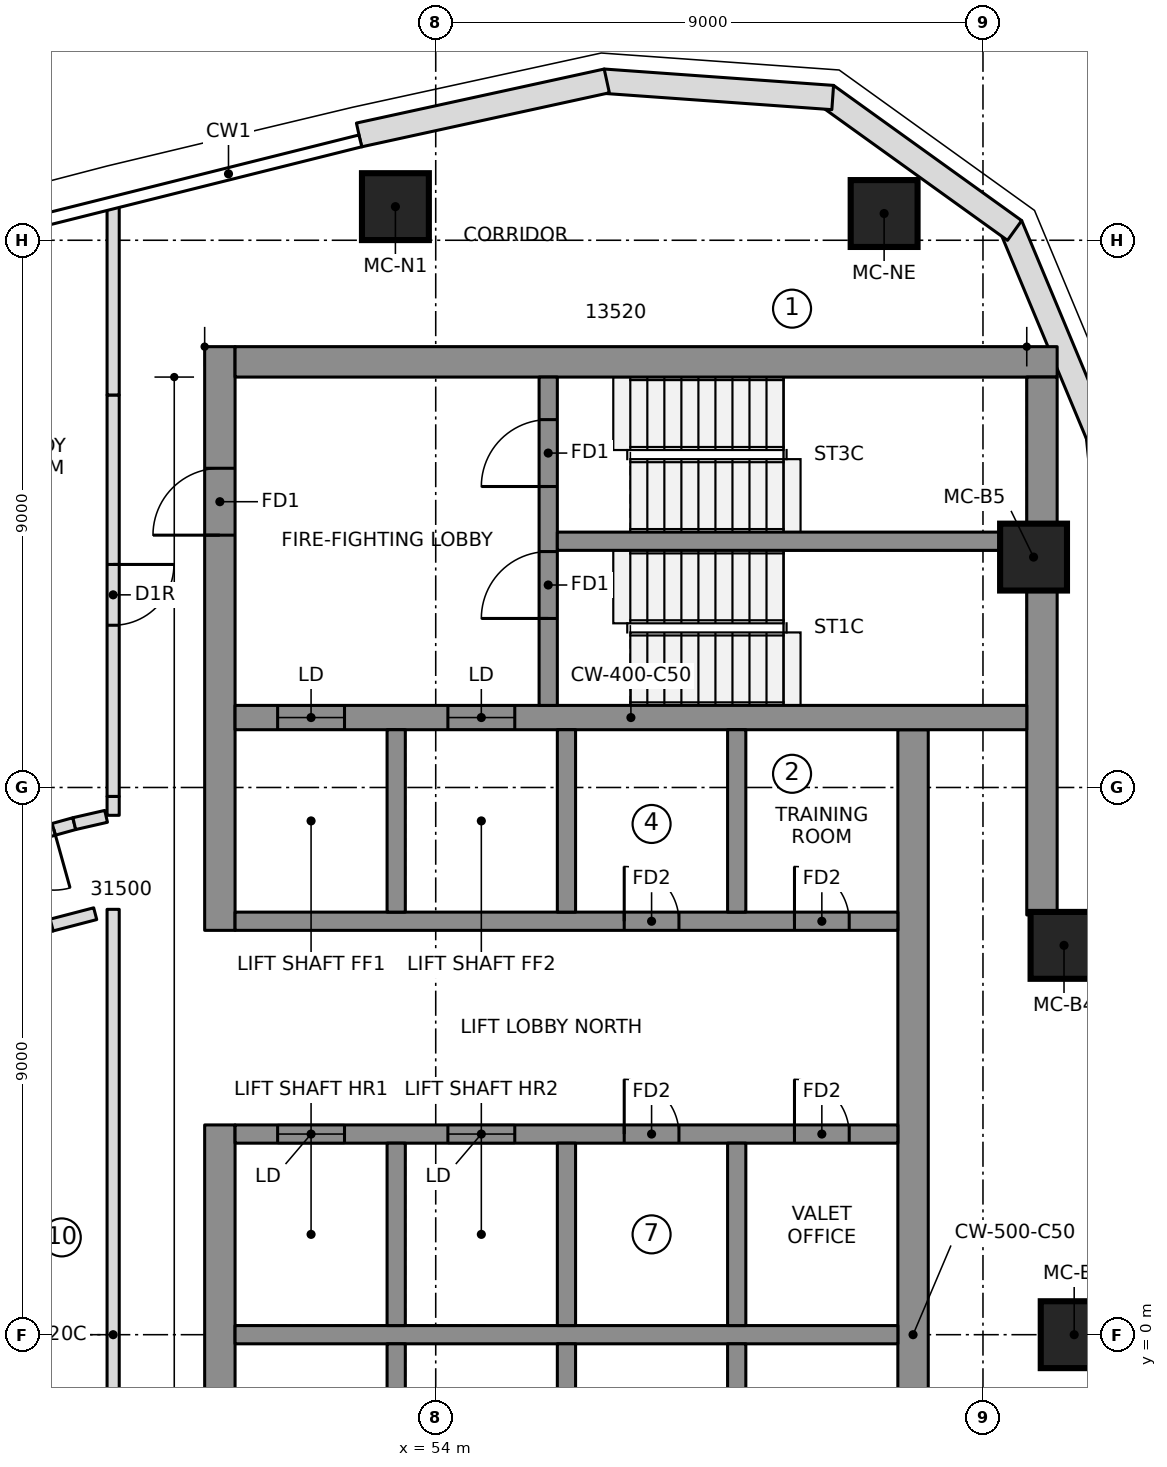
"""IFC4 building model, lengths in metres.
Left out: names, types, materials, properties, quantities, classifications, styles, units other than length and angle.
Written with IfcOpenShell. Run it as: python <this file> out.ifc"""

import sys

from ifc_helpers import new_model, si_unit, direction, frame, frame_2d, origin, origin_2d, place, context, subcontext, project, spatial, polyline, rectangle, outline, extrude, element, fill, save


model = new_model("IFC4")
c1 = context("Model", 3, precision=1e-05, world=origin(), true_north=direction((0.0, 1.0)))
c2 = subcontext(c1, "Body", "Model", "MODEL_VIEW")
j1 = project(units=[si_unit("LENGTHUNIT", "METRE"), si_unit("PLANEANGLEUNIT", "RADIAN")], contexts=[c1])
p1 = place(None, origin())
s1 = spatial("IfcSite", under=j1, at=p1, CompositionType="ELEMENT")
p2 = place(p1, origin())
s2 = spatial("IfcBuilding", under=s1, at=p2, CompositionType="ELEMENT")
p3 = place(p2, frame((0.0, 0.0, 267.9)))
s3 = spatial("IfcBuildingStorey", under=s2, at=p3, CompositionType="ELEMENT", Elevation=267.9)
p4 = place(p3, frame((50.45, 6.65, 0.0), z_axis=(0.0, 0.0, 1.0), x_axis=(0.0, 1.0, 0.0)))
e1 = element("IfcWall", 1, at=p4, inside=s3, PredefinedType="SHEAR", context=c2, shape_type="SweptSolid", body=[
    extrude(rectangle(XDim=9.6, YDim=0.5, at=frame_2d((4.8, 0.0))), origin(), (0.0, 0.0, 1.0), 3.55),
])
p5 = place(p4, frame((6.5, 0.0, 0.0)))
e2 = element("IfcOpeningElement", 2, at=p5, cuts=e1, PredefinedType="OPENING", context=c2, shape_type="SweptSolid", body=[
    extrude(rectangle(XDim=1.1, YDim=2.1, at=frame_2d((0.55, 1.05))), frame((0.0, 0.26, 0.0), z_axis=(0.0, -1.0, 0.0), x_axis=(1.0, 0.0, 0.0)), (0.0, 0.0, 1.0), 0.52),
])
p6 = place(p3, frame((50.45, -3.45, 0.0), z_axis=(0.0, 0.0, 1.0), x_axis=(0.0, 1.0, 0.0)))
e3 = element("IfcWall", 3, at=p6, inside=s3, PredefinedType="SHEAR", context=c2, shape_type="SweptSolid", body=[
    extrude(rectangle(XDim=6.9, YDim=0.5, at=frame_2d((3.45, 0.0))), origin(), (0.0, 0.0, 1.0), 3.55),
])
p7 = place(p3, frame((50.7, 16.0, 0.0), z_axis=(0.0, 0.0, 1.0), x_axis=(1.0, 0.0, 0.0)))
e4 = element("IfcWall", 4, at=p7, inside=s3, PredefinedType="SHEAR", context=c2, shape_type="SweptSolid", body=[
    extrude(rectangle(XDim=13.52, YDim=0.5, at=frame_2d((6.76, 0.0))), origin(), (0.0, 0.0, 1.0), 3.55),
])
p8 = place(p3, frame((63.97, 6.903, 0.0), z_axis=(0.0, 0.0, 1.0), x_axis=(0.0, 1.0, 0.0)))
e5 = element("IfcWall", 5, at=p8, inside=s3, PredefinedType="SHEAR", context=c2, shape_type="SweptSolid", body=[
    extrude(rectangle(XDim=8.847, YDim=0.5, at=frame_2d((4.423, 0.0))), origin(), (0.0, 0.0, 1.0), 3.55),
])
p9 = place(p3, frame((61.85, -9.95, 0.0), z_axis=(0.0, 0.0, 1.0), x_axis=(0.0, 1.0, 0.0)))
e6 = element("IfcWall", 6, at=p9, inside=s3, PredefinedType="SHEAR", context=c2, shape_type="SweptSolid", body=[
    extrude(rectangle(XDim=19.9, YDim=0.5, at=frame_2d((9.95, 0.0))), origin(), (0.0, 0.0, 1.0), 3.55),
])
p10 = place(p3, frame((50.7, 10.15, 0.0), z_axis=(0.0, 0.0, 1.0), x_axis=(1.0, 0.0, 0.0)))
e7 = element("IfcWall", 7, at=p10, inside=s3, PredefinedType="SHEAR", context=c2, shape_type="SweptSolid", body=[
    extrude(rectangle(XDim=13.02, YDim=0.4, at=frame_2d((6.51, 0.0))), origin(), (0.0, 0.0, 1.0), 3.55),
])
p11 = place(p10, frame((0.7, 0.0, 0.0)))
e8 = element("IfcOpeningElement", 8, at=p11, cuts=e7, PredefinedType="OPENING", context=c2, shape_type="SweptSolid", body=[
    extrude(rectangle(XDim=1.1, YDim=2.1, at=frame_2d((0.55, 1.05))), frame((0.0, 0.21, 0.0), z_axis=(0.0, -1.0, 0.0), x_axis=(1.0, 0.0, 0.0)), (0.0, 0.0, 1.0), 0.42),
])
p12 = place(p10, frame((3.5, 0.0, 0.0)))
e9 = element("IfcOpeningElement", 9, at=p12, cuts=e7, PredefinedType="OPENING", context=c2, shape_type="SweptSolid", body=[
    extrude(rectangle(XDim=1.1, YDim=2.1, at=frame_2d((0.55, 1.05))), frame((0.0, 0.21, 0.0), z_axis=(0.0, -1.0, 0.0), x_axis=(1.0, 0.0, 0.0)), (0.0, 0.0, 1.0), 0.42),
])
p13 = place(p3, frame((50.7, 0.0, 0.0), z_axis=(0.0, 0.0, 1.0), x_axis=(1.0, 0.0, 0.0)))
e10 = element("IfcWall", 10, at=p13, inside=s3, PredefinedType="SHEAR", context=c2, shape_type="SweptSolid", body=[
    extrude(rectangle(XDim=10.9, YDim=0.3, at=frame_2d((5.45, 0.0))), origin(), (0.0, 0.0, 1.0), 3.55),
])
p14 = place(p3, frame((50.7, 3.3, 0.0), z_axis=(0.0, 0.0, 1.0), x_axis=(1.0, 0.0, 0.0)))
e11 = element("IfcWall", 11, at=p14, inside=s3, PredefinedType="SHEAR", context=c2, shape_type="SweptSolid", body=[
    extrude(rectangle(XDim=10.9, YDim=0.3, at=frame_2d((5.45, 0.0))), origin(), (0.0, 0.0, 1.0), 3.55),
])
p15 = place(p14, frame((0.7, 0.0, 0.0)))
e12 = element("IfcOpeningElement", 12, at=p15, cuts=e11, PredefinedType="OPENING", context=c2, shape_type="SweptSolid", body=[
    extrude(rectangle(XDim=1.1, YDim=2.1, at=frame_2d((0.55, 1.05))), frame((0.0, 0.16, 0.0), z_axis=(0.0, -1.0, 0.0), x_axis=(1.0, 0.0, 0.0)), (0.0, 0.0, 1.0), 0.32),
])
p16 = place(p14, frame((3.5, 0.0, 0.0)))
e13 = element("IfcOpeningElement", 13, at=p16, cuts=e11, PredefinedType="OPENING", context=c2, shape_type="SweptSolid", body=[
    extrude(rectangle(XDim=1.1, YDim=2.1, at=frame_2d((0.55, 1.05))), frame((0.0, 0.16, 0.0), z_axis=(0.0, -1.0, 0.0), x_axis=(1.0, 0.0, 0.0)), (0.0, 0.0, 1.0), 0.32),
])
p17 = place(p14, frame((6.4, 0.0, 0.0)))
e14 = element("IfcOpeningElement", 14, at=p17, cuts=e11, PredefinedType="OPENING", context=c2, shape_type="SweptSolid", body=[
    extrude(rectangle(XDim=0.9, YDim=2.1, at=frame_2d((0.45, 1.05))), frame((0.0, 0.16, 0.0), z_axis=(0.0, -1.0, 0.0), x_axis=(1.0, 0.0, 0.0)), (0.0, 0.0, 1.0), 0.32),
])
p18 = place(p14, frame((9.2, 0.0, 0.0)))
e15 = element("IfcOpeningElement", 15, at=p18, cuts=e11, PredefinedType="OPENING", context=c2, shape_type="SweptSolid", body=[
    extrude(rectangle(XDim=0.9, YDim=2.1, at=frame_2d((0.45, 1.05))), frame((0.0, 0.16, 0.0), z_axis=(0.0, -1.0, 0.0), x_axis=(1.0, 0.0, 0.0)), (0.0, 0.0, 1.0), 0.32),
])
p19 = place(p3, frame((50.7, 6.8, 0.0), z_axis=(0.0, 0.0, 1.0), x_axis=(1.0, 0.0, 0.0)))
e16 = element("IfcWall", 16, at=p19, inside=s3, PredefinedType="SHEAR", context=c2, shape_type="SweptSolid", body=[
    extrude(rectangle(XDim=10.9, YDim=0.3, at=frame_2d((5.45, 0.0))), origin(), (0.0, 0.0, 1.0), 3.55),
])
p20 = place(p19, frame((6.4, 0.0, 0.0)))
e17 = element("IfcOpeningElement", 17, at=p20, cuts=e16, PredefinedType="OPENING", context=c2, shape_type="SweptSolid", body=[
    extrude(rectangle(XDim=0.9, YDim=2.1, at=frame_2d((0.45, 1.05))), frame((0.0, 0.16, 0.0), z_axis=(0.0, -1.0, 0.0), x_axis=(1.0, 0.0, 0.0)), (0.0, 0.0, 1.0), 0.32),
])
p21 = place(p19, frame((9.2, 0.0, 0.0)))
e18 = element("IfcOpeningElement", 18, at=p21, cuts=e16, PredefinedType="OPENING", context=c2, shape_type="SweptSolid", body=[
    extrude(rectangle(XDim=0.9, YDim=2.1, at=frame_2d((0.45, 1.05))), frame((0.0, 0.16, 0.0), z_axis=(0.0, -1.0, 0.0), x_axis=(1.0, 0.0, 0.0)), (0.0, 0.0, 1.0), 0.32),
])
for number, where, z_axis, x_axis in (
    (19, (53.35, 0.15, 0.0), (0.0, 0.0, 1.0), (0.0, 1.0, 0.0)),
    (20, (53.35, 6.95, 0.0), (0.0, 0.0, 1.0), (0.0, 1.0, 0.0)),
    (21, (56.15, 0.15, 0.0), (0.0, 0.0, 1.0), (0.0, 1.0, 0.0)),
    (22, (56.15, 6.95, 0.0), (0.0, 0.0, 1.0), (0.0, 1.0, 0.0)),
    (23, (58.95, 0.15, 0.0), (0.0, 0.0, 1.0), (0.0, 1.0, 0.0)),
    (24, (58.95, 6.95, 0.0), (0.0, 0.0, 1.0), (0.0, 1.0, 0.0)),
    (25, (53.35, -3.15, 0.0), (0.0, 0.0, 1.0), (0.0, 1.0, 0.0)),
    (26, (56.15, -3.15, 0.0), (0.0, 0.0, 1.0), (0.0, 1.0, 0.0)),
    (27, (58.95, -3.15, 0.0), (0.0, 0.0, 1.0), (0.0, 1.0, 0.0)),
):
    element("IfcWall", number, at=place(p3, frame(where, z_axis=z_axis, x_axis=x_axis)), inside=s3, PredefinedType="SHEAR", context=c2, shape_type="SweptSolid", body=[
        extrude(rectangle(XDim=3.0, YDim=0.3, at=frame_2d((1.5, 0.0))), origin(), (0.0, 0.0, 1.0), 3.55),
    ])
p22 = place(p3, frame((55.85, 10.35, 0.0), z_axis=(0.0, 0.0, 1.0), x_axis=(0.0, 1.0, 0.0)))
e28 = element("IfcWall", 28, at=p22, inside=s3, PredefinedType="SHEAR", context=c2, shape_type="SweptSolid", body=[
    extrude(rectangle(XDim=5.4, YDim=0.3, at=frame_2d((2.7, 0.0))), origin(), (0.0, 0.0, 1.0), 3.55),
])
p23 = place(p22, frame((1.43, 0.0, 0.0)))
e29 = element("IfcOpeningElement", 29, at=p23, cuts=e28, PredefinedType="OPENING", context=c2, shape_type="SweptSolid", body=[
    extrude(rectangle(XDim=1.1, YDim=2.1, at=frame_2d((0.55, 1.05))), frame((0.0, 0.16, 0.0), z_axis=(0.0, -1.0, 0.0), x_axis=(1.0, 0.0, 0.0)), (0.0, 0.0, 1.0), 0.32),
])
p24 = place(p22, frame((3.6, 0.0, 0.0)))
e30 = element("IfcOpeningElement", 30, at=p24, cuts=e28, PredefinedType="OPENING", context=c2, shape_type="SweptSolid", body=[
    extrude(rectangle(XDim=1.1, YDim=2.1, at=frame_2d((0.55, 1.05))), frame((0.0, 0.16, 0.0), z_axis=(0.0, -1.0, 0.0), x_axis=(1.0, 0.0, 0.0)), (0.0, 0.0, 1.0), 0.32),
])
p25 = place(p3, frame((56.0, 13.05, 0.0), z_axis=(0.0, 0.0, 1.0), x_axis=(1.0, 0.0, 0.0)))
e31 = element("IfcWall", 31, at=p25, inside=s3, PredefinedType="SHEAR", context=c2, shape_type="SweptSolid", body=[
    extrude(rectangle(XDim=7.72, YDim=0.3, at=frame_2d((3.86, 0.0))), origin(), (0.0, 0.0, 1.0), 3.55),
])
for number, where, z_axis, x_axis in (
    (32, (64.5, 0.0, 0.0), (0.0, 0.0, 1.0), (1.0, 0.0, 0.0)),
    (33, (64.333, 6.403, 0.0), (0.0, 0.0, 1.0), (1.0, 0.0, 0.0)),
    (34, (63.832, 12.789, 0.0), (0.0, 0.0, 1.0), (1.0, 0.0, 0.0)),
    (35, (61.374, 18.44, 0.0), (0.0, 0.0, 1.0), (1.0, 0.0, 0.0)),
    (36, (53.337, 18.553, 0.0), (0.0, 0.0, 1.0), (1.0, 0.0, 0.0)),
):
    element("IfcColumn", number, at=place(p3, frame(where, z_axis=z_axis, x_axis=x_axis)), inside=s3, PredefinedType="COLUMN", context=c2, shape_type="SweptSolid", body=[
        extrude(rectangle(XDim=1.1, YDim=1.1, at=origin_2d()), origin(), (0.0, 0.0, 1.0), 3.55),
    ])
p26 = place(p3, frame((65.331, 10.571, 0.0), z_axis=(0.0, 0.0, 1.0), x_axis=(-0.102249826987, 0.994758751096, 0.0)))
e37 = element("IfcWall", 37, at=p26, inside=s3, PredefinedType="NOTDEFINED", context=c2, shape_type="SweptSolid", body=[
    extrude(outline(polyline([(-0.003, -0.2), (4.263, -0.2), (4.204, 0.2), (0.003, 0.2), (-0.003, -0.2)])), origin(), (0.0, 0.0, 1.0), 3.25),
])
p27 = place(p3, frame((64.898, 14.782, 0.0), z_axis=(0.0, 0.0, 1.0), x_axis=(-0.385285857918, 0.922797273343, 0.0)))
e38 = element("IfcWall", 38, at=p27, inside=s3, PredefinedType="NOTDEFINED", context=c2, shape_type="SweptSolid", body=[
    extrude(outline(polyline([(-0.03, -0.2), (3.753, -0.2), (3.64, 0.2), (0.03, 0.2), (-0.03, -0.2)])), origin(), (0.0, 0.0, 1.0), 3.25),
])
p28 = place(p3, frame((63.474, 18.194, 0.0), z_axis=(0.0, 0.0, 1.0), x_axis=(-0.811962548682, 0.583709533533, 0.0)))
e39 = element("IfcWall", 39, at=p28, inside=s3, PredefinedType="NOTDEFINED", context=c2, shape_type="SweptSolid", body=[
    extrude(outline(polyline([(-0.057, -0.2), (3.753, -0.2), (3.64, 0.2), (0.057, 0.2), (-0.057, -0.2)])), origin(), (0.0, 0.0, 1.0), 3.25),
])
p29 = place(p3, frame((60.472, 20.352, 0.0), z_axis=(0.0, 0.0, 1.0), x_axis=(-0.99746272096, 0.071190731806, 0.0)))
e40 = element("IfcWall", 40, at=p29, inside=s3, PredefinedType="NOTDEFINED", context=c2, shape_type="SweptSolid", body=[
    extrude(outline(polyline([(-0.057, -0.2), (3.726, -0.2), (3.668, 0.2), (0.057, 0.2), (-0.057, -0.2)])), origin(), (0.0, 0.0, 1.0), 3.25),
])
p30 = place(p3, frame((56.785, 20.615, 0.0), z_axis=(0.0, 0.0, 1.0), x_axis=(-0.977020225348, -0.213146614471, 0.0)))
e41 = element("IfcWall", 41, at=p30, inside=s3, PredefinedType="NOTDEFINED", context=c2, shape_type="SweptSolid", body=[
    extrude(outline(polyline([(-0.029, -0.2), (4.142, -0.2), (4.142, 0.2), (0.029, 0.2), (-0.029, -0.2)])), origin(), (0.0, 0.0, 1.0), 3.25),
])
p31 = place(p3, frame((48.056, 8.405, 0.0), z_axis=(0.0, 0.0, 1.0), x_axis=(-0.963429942227, -0.267960344866, 0.0)))
e42 = element("IfcWall", 42, at=p31, inside=s3, PredefinedType="PARTITIONING", context=c2, shape_type="SweptSolid", body=[
    extrude(rectangle(XDim=4.177, YDim=0.2, at=frame_2d((2.089, 0.0))), origin(), (0.0, 0.0, 1.0), 3.25),
])
p32 = place(p31, frame((0.35, 0.0, 0.0)))
e43 = element("IfcOpeningElement", 43, at=p32, cuts=e42, PredefinedType="OPENING", context=c2, shape_type="SweptSolid", body=[
    extrude(rectangle(XDim=1.0, YDim=2.1, at=frame_2d((0.5, 1.05))), frame((0.0, 0.11, 0.0), z_axis=(0.0, -1.0, 0.0), x_axis=(1.0, 0.0, 0.0)), (0.0, 0.0, 1.0), 0.22),
])
p33 = place(p3, frame((43.918, 5.675, 0.0), z_axis=(0.0, 0.0, 1.0), x_axis=(0.962411212211, 0.271596499628, 0.0)))
e44 = element("IfcWall", 44, at=p33, inside=s3, PredefinedType="PARTITIONING", context=c2, shape_type="SweptSolid", body=[
    extrude(rectangle(XDim=3.913, YDim=0.2, at=frame_2d((1.957, 0.0))), origin(), (0.0, 0.0, 1.0), 3.25),
])
p34 = place(p33, frame((1.457, 0.0, 0.0)))
e45 = element("IfcOpeningElement", 45, at=p34, cuts=e44, PredefinedType="OPENING", context=c2, shape_type="SweptSolid", body=[
    extrude(rectangle(XDim=1.0, YDim=2.1, at=frame_2d((0.5, 1.05))), frame((0.0, 0.11, 0.0), z_axis=(0.0, -1.0, 0.0), x_axis=(1.0, 0.0, 0.0)), (0.0, 0.0, 1.0), 0.22),
])
p35 = place(p3, frame((47.684, 6.738, 0.0), z_axis=(0.0, 0.0, 1.0), x_axis=(0.967585713416, 0.252542842294, 0.0)))
e46 = element("IfcWall", 46, at=p35, inside=s3, PredefinedType="PARTITIONING", context=c2, shape_type="SweptSolid", body=[
    extrude(rectangle(XDim=0.74, YDim=0.2, at=frame_2d((0.37, 0.0))), origin(), (0.0, 0.0, 1.0), 3.25),
])
p36 = place(p3, frame((48.695, 15.455, 0.0), z_axis=(0.0, 0.0, 1.0), x_axis=(0.0, -1.0, 0.0)))
e47 = element("IfcWall", 47, at=p36, inside=s3, PredefinedType="PARTITIONING", context=c2, shape_type="SweptSolid", body=[
    extrude(rectangle(XDim=6.603, YDim=0.2, at=frame_2d((3.302, 0.0))), origin(), (0.0, 0.0, 1.0), 3.25),
])
p37 = place(p36, frame((2.787, 0.0, 0.0)))
e48 = element("IfcOpeningElement", 48, at=p37, cuts=e47, PredefinedType="OPENING", context=c2, shape_type="SweptSolid", body=[
    extrude(rectangle(XDim=1.0, YDim=2.1, at=frame_2d((0.5, 1.05))), frame((0.0, 0.11, 0.0), z_axis=(0.0, -1.0, 0.0), x_axis=(1.0, 0.0, 0.0)), (0.0, 0.0, 1.0), 0.22),
])
p38 = place(p3, frame((48.695, 6.996, 0.0), z_axis=(0.0, 0.0, 1.0), x_axis=(0.0, -1.0, 0.0)))
e49 = element("IfcWall", 49, at=p38, inside=s3, PredefinedType="PARTITIONING", context=c2, shape_type="SweptSolid", body=[
    extrude(rectangle(XDim=13.992, YDim=0.2, at=frame_2d((6.996, 0.0))), origin(), (0.0, 0.0, 1.0), 3.25),
])
p39 = place(p3, frame((48.695, 18.553, 0.0), z_axis=(0.0, 0.0, 1.0), x_axis=(0.0, -1.0, 0.0)))
e50 = element("IfcWall", 50, at=p39, inside=s3, PredefinedType="PARTITIONING", context=c2, shape_type="SweptSolid", body=[
    extrude(rectangle(XDim=3.098, YDim=0.2, at=frame_2d((1.549, 0.0))), origin(), (0.0, 0.0, 1.0), 3.25),
])
p40 = place(p3, frame((48.695, 8.852, 0.0), z_axis=(0.0, 0.0, 1.0), x_axis=(0.0, -1.0, 0.0)))
e51 = element("IfcWall", 51, at=p40, inside=s3, PredefinedType="PARTITIONING", context=c2, shape_type="SweptSolid", body=[
    extrude(rectangle(XDim=0.31, YDim=0.2, at=frame_2d((0.155, 0.0))), origin(), (0.0, 0.0, 1.0), 3.25),
])
p41 = place(p3, frame((48.579, 8.525, 0.0), z_axis=(0.0, 0.0, 1.0), x_axis=(-0.974742633665, -0.223331140051, 0.0)))
e52 = element("IfcWall", 52, at=p41, inside=s3, PredefinedType="PARTITIONING", context=c2, shape_type="SweptSolid", body=[
    extrude(rectangle(XDim=0.537, YDim=0.2, at=frame_2d((0.269, 0.0))), origin(), (0.0, 0.0, 1.0), 3.25),
])
p42 = place(p32, origin())
e53 = element("IfcDoor", 53, at=p42, inside=s3, OperationType="SINGLE_SWING_RIGHT", PredefinedType="DOOR", context=c2, shape_type="SweptSolid", body=[
    extrude(rectangle(XDim=1.0, YDim=2.1, at=frame_2d((0.5, 1.05))), frame((0.0, 0.025, 0.0), z_axis=(0.0, -1.0, 0.0), x_axis=(1.0, 0.0, 0.0)), (0.0, 0.0, 1.0), 0.05),
])
fill(e43, e53)
p43 = place(p37, origin())
e54 = element("IfcDoor", 54, at=p43, inside=s3, OperationType="SINGLE_SWING_RIGHT", PredefinedType="DOOR", context=c2, shape_type="SweptSolid", body=[
    extrude(rectangle(XDim=1.0, YDim=2.1, at=frame_2d((0.5, 1.05))), frame((0.0, 0.025, 0.0), z_axis=(0.0, -1.0, 0.0), x_axis=(1.0, 0.0, 0.0)), (0.0, 0.0, 1.0), 0.05),
])
fill(e48, e54)
p44 = place(p11, origin())
e55 = element("IfcDoor", 55, at=p44, inside=s3, OperationType="DOUBLE_DOOR_SLIDING", PredefinedType="DOOR", context=c2, shape_type="SweptSolid", body=[
    extrude(rectangle(XDim=1.1, YDim=2.1, at=frame_2d((0.55, 1.05))), frame((0.0, 0.025, 0.0), z_axis=(0.0, -1.0, 0.0), x_axis=(1.0, 0.0, 0.0)), (0.0, 0.0, 1.0), 0.05),
])
fill(e8, e55)
p45 = place(p12, origin())
e56 = element("IfcDoor", 56, at=p45, inside=s3, OperationType="DOUBLE_DOOR_SLIDING", PredefinedType="DOOR", context=c2, shape_type="SweptSolid", body=[
    extrude(rectangle(XDim=1.1, YDim=2.1, at=frame_2d((0.55, 1.05))), frame((0.0, 0.025, 0.0), z_axis=(0.0, -1.0, 0.0), x_axis=(1.0, 0.0, 0.0)), (0.0, 0.0, 1.0), 0.05),
])
fill(e9, e56)
p46 = place(p15, origin())
e57 = element("IfcDoor", 57, at=p46, inside=s3, OperationType="DOUBLE_DOOR_SLIDING", PredefinedType="DOOR", context=c2, shape_type="SweptSolid", body=[
    extrude(rectangle(XDim=1.1, YDim=2.1, at=frame_2d((0.55, 1.05))), frame((0.0, 0.025, 0.0), z_axis=(0.0, -1.0, 0.0), x_axis=(1.0, 0.0, 0.0)), (0.0, 0.0, 1.0), 0.05),
])
fill(e12, e57)
p47 = place(p16, origin())
e58 = element("IfcDoor", 58, at=p47, inside=s3, OperationType="DOUBLE_DOOR_SLIDING", PredefinedType="DOOR", context=c2, shape_type="SweptSolid", body=[
    extrude(rectangle(XDim=1.1, YDim=2.1, at=frame_2d((0.55, 1.05))), frame((0.0, 0.025, 0.0), z_axis=(0.0, -1.0, 0.0), x_axis=(1.0, 0.0, 0.0)), (0.0, 0.0, 1.0), 0.05),
])
fill(e13, e58)
p48 = place(p23, origin())
e59 = element("IfcDoor", 59, at=p48, inside=s3, OperationType="SINGLE_SWING_RIGHT", PredefinedType="DOOR", context=c2, shape_type="SweptSolid", body=[
    extrude(rectangle(XDim=1.1, YDim=2.1, at=frame_2d((0.55, 1.05))), frame((0.0, 0.025, 0.0), z_axis=(0.0, -1.0, 0.0), x_axis=(1.0, 0.0, 0.0)), (0.0, 0.0, 1.0), 0.05),
])
fill(e29, e59)
p49 = place(p24, origin())
e60 = element("IfcDoor", 60, at=p49, inside=s3, OperationType="SINGLE_SWING_RIGHT", PredefinedType="DOOR", context=c2, shape_type="SweptSolid", body=[
    extrude(rectangle(XDim=1.1, YDim=2.1, at=frame_2d((0.55, 1.05))), frame((0.0, 0.025, 0.0), z_axis=(0.0, -1.0, 0.0), x_axis=(1.0, 0.0, 0.0)), (0.0, 0.0, 1.0), 0.05),
])
fill(e30, e60)
p50 = place(p5, origin())
e61 = element("IfcDoor", 61, at=p50, inside=s3, OperationType="SINGLE_SWING_RIGHT", PredefinedType="DOOR", context=c2, shape_type="SweptSolid", body=[
    extrude(rectangle(XDim=1.1, YDim=2.1, at=frame_2d((0.55, 1.05))), frame((0.0, 0.025, 0.0), z_axis=(0.0, -1.0, 0.0), x_axis=(1.0, 0.0, 0.0)), (0.0, 0.0, 1.0), 0.05),
])
fill(e2, e61)
p51 = place(p20, origin())
e62 = element("IfcDoor", 62, at=p51, inside=s3, OperationType="SINGLE_SWING_LEFT", PredefinedType="DOOR", context=c2, shape_type="SweptSolid", body=[
    extrude(rectangle(XDim=0.9, YDim=2.1, at=frame_2d((0.45, 1.05))), frame((0.0, 0.025, 0.0), z_axis=(0.0, -1.0, 0.0), x_axis=(1.0, 0.0, 0.0)), (0.0, 0.0, 1.0), 0.05),
])
fill(e17, e62)
p52 = place(p21, origin())
e63 = element("IfcDoor", 63, at=p52, inside=s3, OperationType="SINGLE_SWING_LEFT", PredefinedType="DOOR", context=c2, shape_type="SweptSolid", body=[
    extrude(rectangle(XDim=0.9, YDim=2.1, at=frame_2d((0.45, 1.05))), frame((0.0, 0.025, 0.0), z_axis=(0.0, -1.0, 0.0), x_axis=(1.0, 0.0, 0.0)), (0.0, 0.0, 1.0), 0.05),
])
fill(e18, e63)
p53 = place(p17, origin())
e64 = element("IfcDoor", 64, at=p53, inside=s3, OperationType="SINGLE_SWING_LEFT", PredefinedType="DOOR", context=c2, shape_type="SweptSolid", body=[
    extrude(rectangle(XDim=0.9, YDim=2.1, at=frame_2d((0.45, 1.05))), frame((0.0, 0.025, 0.0), z_axis=(0.0, -1.0, 0.0), x_axis=(1.0, 0.0, 0.0)), (0.0, 0.0, 1.0), 0.05),
])
fill(e14, e64)
p54 = place(p18, origin())
e65 = element("IfcDoor", 65, at=p54, inside=s3, OperationType="SINGLE_SWING_LEFT", PredefinedType="DOOR", context=c2, shape_type="SweptSolid", body=[
    extrude(rectangle(XDim=0.9, YDim=2.1, at=frame_2d((0.45, 1.05))), frame((0.0, 0.025, 0.0), z_axis=(0.0, -1.0, 0.0), x_axis=(1.0, 0.0, 0.0)), (0.0, 0.0, 1.0), 0.05),
])
fill(e15, e65)
save(model, sys.argv[1])
